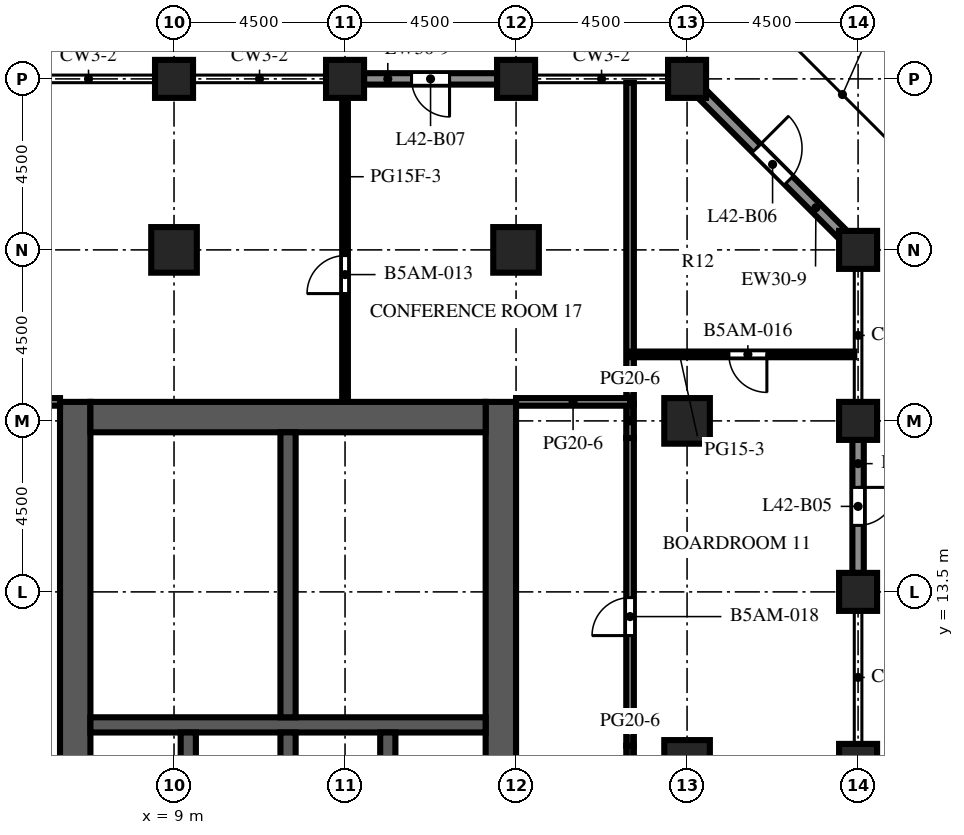
"""IFC4 building model, lengths in metres.
Left out: names, types, materials, properties, quantities, classifications, styles, units other than length and angle.
Written with IfcOpenShell. Run it as: python <this file> out.ifc"""

import sys

from ifc_helpers import new_model, si_unit, direction, frame, frame_2d, origin, origin_2d, place, context, subcontext, project, spatial, rectangle, extrude, element, fill, save


model = new_model("IFC4")
c1 = context("Model", 3, precision=1e-05, world=origin(), true_north=direction((0.0, 1.0)))
c2 = subcontext(c1, "Body", "Model", "MODEL_VIEW")
j1 = project(units=[si_unit("LENGTHUNIT", "METRE"), si_unit("PLANEANGLEUNIT", "RADIAN")], contexts=[c1])
p1 = place(None, origin())
s1 = spatial("IfcSite", under=j1, at=p1, CompositionType="ELEMENT")
p2 = place(p1, origin())
s2 = spatial("IfcBuilding", under=s1, at=p2, CompositionType="ELEMENT")
p3 = place(p2, frame((0.0, 0.0, 185.5)))
s3 = spatial("IfcBuildingStorey", under=s2, at=p3, CompositionType="ELEMENT", Elevation=185.5)
for number, where, z_axis, x_axis in (
    (1, (9.0, 27.0, 0.0), (0.0, 0.0, 1.0), (1.0, 0.0, 0.0)),
    (2, (13.5, 27.0, 0.0), (0.0, 0.0, 1.0), (1.0, 0.0, 0.0)),
    (3, (18.0, 27.0, 0.0), (0.0, 0.0, 1.0), (1.0, 0.0, 0.0)),
    (4, (22.5, 27.0, 0.0), (0.0, 0.0, 1.0), (1.0, 0.0, 0.0)),
):
    element("IfcColumn", number, at=place(p3, frame(where, z_axis=z_axis, x_axis=x_axis)), inside=s3, PredefinedType="COLUMN", context=c2, shape_type="SweptSolid", body=[
        extrude(rectangle(XDim=1.0, YDim=1.0, at=origin_2d()), origin(), (0.0, 0.0, 1.0), 6.0),
    ])
p4 = place(p3, frame((27.0, 9.0, 0.0), z_axis=(0.0, 0.0, 1.0), x_axis=(1.0, 0.0, 0.0)))
e5 = element("IfcColumn", 5, at=p4, inside=s3, PredefinedType="COLUMN", context=c2, shape_type="SweptSolid", body=[
    extrude(rectangle(XDim=1.0, YDim=1.0, at=origin_2d()), origin(), (0.0, 0.0, 1.0), 5.55),
])
p5 = place(p3, frame((27.0, 13.5, 0.0), z_axis=(0.0, 0.0, 1.0), x_axis=(1.0, 0.0, 0.0)))
e6 = element("IfcColumn", 6, at=p5, inside=s3, PredefinedType="COLUMN", context=c2, shape_type="SweptSolid", body=[
    extrude(rectangle(XDim=1.0, YDim=1.0, at=origin_2d()), origin(), (0.0, 0.0, 1.0), 6.0),
])
p6 = place(p3, frame((27.0, 18.0, 0.0), z_axis=(0.0, 0.0, 1.0), x_axis=(1.0, 0.0, 0.0)))
e7 = element("IfcColumn", 7, at=p6, inside=s3, PredefinedType="COLUMN", context=c2, shape_type="SweptSolid", body=[
    extrude(rectangle(XDim=1.0, YDim=1.0, at=origin_2d()), origin(), (0.0, 0.0, 1.0), 5.55),
])
p7 = place(p3, frame((27.0, 22.5, 0.0), z_axis=(0.0, 0.0, 1.0), x_axis=(1.0, 0.0, 0.0)))
e8 = element("IfcColumn", 8, at=p7, inside=s3, PredefinedType="COLUMN", context=c2, shape_type="SweptSolid", body=[
    extrude(rectangle(XDim=1.0, YDim=1.0, at=origin_2d()), origin(), (0.0, 0.0, 1.0), 6.0),
])
for number, where, z_axis, x_axis in (
    (9, (9.0, 22.5, 0.0), (0.0, 0.0, 1.0), (1.0, 0.0, 0.0)),
    (10, (18.0, 22.5, 0.0), (0.0, 0.0, 1.0), (1.0, 0.0, 0.0)),
):
    element("IfcColumn", number, at=place(p3, frame(where, z_axis=z_axis, x_axis=x_axis)), inside=s3, PredefinedType="COLUMN", context=c2, shape_type="SweptSolid", body=[
        extrude(rectangle(XDim=1.2, YDim=1.2, at=origin_2d()), origin(), (0.0, 0.0, 1.0), 6.0),
    ])
for number, where, z_axis, x_axis in (
    (11, (22.5, 9.0, 0.0), (0.0, 0.0, 1.0), (1.0, 0.0, 0.0)),
    (12, (22.5, 18.0, 0.0), (0.0, 0.0, 1.0), (1.0, 0.0, 0.0)),
):
    element("IfcColumn", number, at=place(p3, frame(where, z_axis=z_axis, x_axis=x_axis)), inside=s3, PredefinedType="COLUMN", context=c2, shape_type="SweptSolid", body=[
        extrude(rectangle(XDim=1.2, YDim=1.2, at=origin_2d()), origin(), (0.0, 0.0, 1.0), 5.55),
    ])
p8 = place(p3, frame((6.4, -9.0, 0.0), z_axis=(0.0, 0.0, 1.0), x_axis=(0.0, 1.0, 0.0)))
e13 = element("IfcWall", 13, at=p8, inside=s3, PredefinedType="SHEAR", context=c2, shape_type="SweptSolid", body=[
    extrude(rectangle(XDim=27.5, YDim=0.8, at=frame_2d((13.75, 0.0))), origin(), (0.0, 0.0, 1.0), 6.0),
])
p9 = place(p8, frame((12.55, 0.0, 0.0)))
e14 = element("IfcOpeningElement", 14, at=p9, cuts=e13, PredefinedType="OPENING", context=c2, shape_type="SweptSolid", body=[
    extrude(rectangle(XDim=2.4, YDim=2.4, at=frame_2d((1.2, 1.2))), frame((0.0, 0.41, 0.0), z_axis=(0.0, -1.0, 0.0), x_axis=(1.0, 0.0, 0.0)), (0.0, 0.0, 1.0), 0.82),
])
p10 = place(p8, frame((3.85, 0.0, 0.0)))
e15 = element("IfcOpeningElement", 15, at=p10, cuts=e13, PredefinedType="OPENING", context=c2, shape_type="SweptSolid", body=[
    extrude(rectangle(XDim=0.95, YDim=2.1, at=frame_2d((0.475, 1.05))), frame((0.0, 0.41, 0.0), z_axis=(0.0, -1.0, 0.0), x_axis=(1.0, 0.0, 0.0)), (0.0, 0.0, 1.0), 0.82),
])
p11 = place(p8, frame((23.475, 0.0, 0.0)))
e16 = element("IfcOpeningElement", 16, at=p11, cuts=e13, PredefinedType="OPENING", context=c2, shape_type="SweptSolid", body=[
    extrude(rectangle(XDim=1.2, YDim=2.1, at=frame_2d((0.6, 1.05))), frame((0.0, 0.41, 0.0), z_axis=(0.0, -1.0, 0.0), x_axis=(1.0, 0.0, 0.0)), (0.0, 0.0, 1.0), 0.82),
])
p12 = place(p3, frame((17.6, -9.0, 0.0), z_axis=(0.0, 0.0, 1.0), x_axis=(0.0, 1.0, 0.0)))
e17 = element("IfcWall", 17, at=p12, inside=s3, PredefinedType="SHEAR", context=c2, shape_type="SweptSolid", body=[
    extrude(rectangle(XDim=27.5, YDim=0.8, at=frame_2d((13.75, 0.0))), origin(), (0.0, 0.0, 1.0), 6.0),
])
p13 = place(p12, frame((12.55, 0.0, 0.0)))
e18 = element("IfcOpeningElement", 18, at=p13, cuts=e17, PredefinedType="OPENING", context=c2, shape_type="SweptSolid", body=[
    extrude(rectangle(XDim=2.4, YDim=2.4, at=frame_2d((1.2, 1.2))), frame((0.0, 0.41, 0.0), z_axis=(0.0, -1.0, 0.0), x_axis=(1.0, 0.0, 0.0)), (0.0, 0.0, 1.0), 0.82),
])
p14 = place(p12, frame((6.825, 0.0, 0.0)))
e19 = element("IfcOpeningElement", 19, at=p14, cuts=e17, PredefinedType="OPENING", context=c2, shape_type="SweptSolid", body=[
    extrude(rectangle(XDim=1.2, YDim=2.1, at=frame_2d((0.6, 1.05))), frame((0.0, 0.41, 0.0), z_axis=(0.0, -1.0, 0.0), x_axis=(1.0, 0.0, 0.0)), (0.0, 0.0, 1.0), 0.82),
])
p15 = place(p12, frame((19.475, 0.0, 0.0)))
e20 = element("IfcOpeningElement", 20, at=p15, cuts=e17, PredefinedType="OPENING", context=c2, shape_type="SweptSolid", body=[
    extrude(rectangle(XDim=1.2, YDim=2.1, at=frame_2d((0.6, 1.05))), frame((0.0, 0.41, 0.0), z_axis=(0.0, -1.0, 0.0), x_axis=(1.0, 0.0, 0.0)), (0.0, 0.0, 1.0), 0.82),
])
p16 = place(p3, frame((6.8, 18.1, 0.0), z_axis=(0.0, 0.0, 1.0), x_axis=(1.0, 0.0, 0.0)))
e21 = element("IfcWall", 21, at=p16, inside=s3, PredefinedType="SHEAR", context=c2, shape_type="SweptSolid", body=[
    extrude(rectangle(XDim=10.4, YDim=0.8, at=frame_2d((5.2, 0.0))), origin(), (0.0, 0.0, 1.0), 6.0),
])
p17 = place(p3, frame((6.8, 10.0, 0.0), z_axis=(0.0, 0.0, 1.0), x_axis=(1.0, 0.0, 0.0)))
e22 = element("IfcWall", 22, at=p17, inside=s3, PredefinedType="SHEAR", context=c2, shape_type="SweptSolid", body=[
    extrude(rectangle(XDim=10.4, YDim=0.4, at=frame_2d((5.2, 0.0))), origin(), (0.0, 0.0, 1.0), 6.0),
])
for number, where, z_axis, x_axis in (
    (23, (9.375, 6.9, 0.0), (0.0, 0.0, 1.0), (0.0, 1.0, 0.0)),
    (24, (12.0, 6.9, 0.0), (0.0, 0.0, 1.0), (0.0, 1.0, 0.0)),
    (25, (14.625, 6.9, 0.0), (0.0, 0.0, 1.0), (0.0, 1.0, 0.0)),
):
    element("IfcWall", number, at=place(p3, frame(where, z_axis=z_axis, x_axis=x_axis)), inside=s3, PredefinedType="SHEAR", context=c2, shape_type="SweptSolid", body=[
        extrude(rectangle(XDim=2.9, YDim=0.4, at=frame_2d((1.45, 0.0))), origin(), (0.0, 0.0, 1.0), 6.0),
    ])
p18 = place(p3, frame((12.0, 10.2, 0.0), z_axis=(0.0, 0.0, 1.0), x_axis=(0.0, 1.0, 0.0)))
e26 = element("IfcWall", 26, at=p18, inside=s3, PredefinedType="SHEAR", context=c2, shape_type="SweptSolid", body=[
    extrude(rectangle(XDim=7.5, YDim=0.4, at=frame_2d((3.75, 0.0))), origin(), (0.0, 0.0, 1.0), 6.0),
])
p19 = place(p3, frame((27.0, 17.5, 0.0), z_axis=(0.0, 0.0, 1.0), x_axis=(0.0, -1.0, 0.0)))
e27 = element("IfcWall", 27, at=p19, inside=s3, PredefinedType="SOLIDWALL", context=c2, shape_type="SweptSolid", body=[
    extrude(rectangle(XDim=3.5, YDim=0.3, at=frame_2d((1.75, 0.0))), origin(), (0.0, 0.0, 1.0), 3.75),
])
p20 = place(p19, frame((1.25, 0.0, 0.0)))
e28 = element("IfcOpeningElement", 28, at=p20, cuts=e27, PredefinedType="OPENING", context=c2, shape_type="SweptSolid", body=[
    extrude(rectangle(XDim=1.0, YDim=2.2, at=frame_2d((0.5, 1.1))), frame((0.0, 0.16, 0.0), z_axis=(0.0, -1.0, 0.0), x_axis=(1.0, 0.0, 0.0)), (0.0, 0.0, 1.0), 0.32),
])
p21 = place(p3, frame((22.894, 26.606, 0.0), z_axis=(0.0, 0.0, 1.0), x_axis=(0.707106781187, -0.707106781187, 0.0)))
e29 = element("IfcWall", 29, at=p21, inside=s3, PredefinedType="SOLIDWALL", context=c2, shape_type="SweptSolid", body=[
    extrude(rectangle(XDim=5.25, YDim=0.3, at=frame_2d((2.625, 0.0))), origin(), (0.0, 0.0, 1.0), 4.75),
])
p22 = place(p21, frame((2.025, 0.0, 0.0)))
e30 = element("IfcOpeningElement", 30, at=p22, cuts=e29, PredefinedType="OPENING", context=c2, shape_type="SweptSolid", body=[
    extrude(rectangle(XDim=1.2, YDim=2.2, at=frame_2d((0.6, 1.1))), frame((0.0, 0.16, 0.0), z_axis=(0.0, -1.0, 0.0), x_axis=(1.0, 0.0, 0.0)), (0.0, 0.0, 1.0), 0.32),
])
p23 = place(p3, frame((14.0, 27.0, 0.0), z_axis=(0.0, 0.0, 1.0), x_axis=(1.0, 0.0, 0.0)))
e31 = element("IfcWall", 31, at=p23, inside=s3, PredefinedType="SOLIDWALL", context=c2, shape_type="SweptSolid", body=[
    extrude(rectangle(XDim=3.5, YDim=0.3, at=frame_2d((1.75, 0.0))), origin(), (0.0, 0.0, 1.0), 4.75),
])
p24 = place(p23, frame((1.25, 0.0, 0.0)))
e32 = element("IfcOpeningElement", 32, at=p24, cuts=e31, PredefinedType="OPENING", context=c2, shape_type="SweptSolid", body=[
    extrude(rectangle(XDim=1.0, YDim=2.2, at=frame_2d((0.5, 1.1))), frame((0.0, 0.16, 0.0), z_axis=(0.0, -1.0, 0.0), x_axis=(1.0, 0.0, 0.0)), (0.0, 0.0, 1.0), 0.32),
])
p25 = place(p3, frame((6.8, 12.45, 0.0), z_axis=(0.0, 0.0, 1.0), x_axis=(1.0, 0.0, 0.0)))
e33 = element("IfcWall", 33, at=p25, inside=s3, PredefinedType="PARTITIONING", context=c2, shape_type="SweptSolid", body=[
    extrude(rectangle(XDim=1.3, YDim=0.1, at=frame_2d((0.65, 0.0))), origin(), (0.0, 0.0, 1.0), 5.55),
])
p26 = place(p25, frame((0.2, 0.0, 0.0)))
e34 = element("IfcOpeningElement", 34, at=p26, cuts=e33, PredefinedType="OPENING", context=c2, shape_type="SweptSolid", body=[
    extrude(rectangle(XDim=0.9, YDim=2.1, at=frame_2d((0.45, 1.05))), frame((0.0, 0.06, 0.0), z_axis=(0.0, -1.0, 0.0), x_axis=(1.0, 0.0, 0.0)), (0.0, 0.0, 1.0), 0.12),
])
p27 = place(p3, frame((8.1, 12.45, 0.0), z_axis=(0.0, 0.0, 1.0), x_axis=(1.0, 0.0, 0.0)))
e35 = element("IfcWall", 35, at=p27, inside=s3, PredefinedType="PARTITIONING", context=c2, shape_type="SweptSolid", body=[
    extrude(rectangle(XDim=3.7, YDim=0.1, at=frame_2d((1.85, 0.0))), origin(), (0.0, 0.0, 1.0), 5.55),
])
p28 = place(p3, frame((8.1, 12.45, 0.0), z_axis=(0.0, 0.0, 1.0), x_axis=(0.0, 1.0, 0.0)))
e36 = element("IfcWall", 36, at=p28, inside=s3, PredefinedType="PARTITIONING", context=c2, shape_type="SweptSolid", body=[
    extrude(rectangle(XDim=2.625, YDim=0.1, at=frame_2d((1.312, 0.0))), origin(), (0.0, 0.0, 1.0), 5.55),
])
p29 = place(p28, frame((0.812, 0.0, 0.0)))
e37 = element("IfcOpeningElement", 37, at=p29, cuts=e36, PredefinedType="OPENING", context=c2, shape_type="SweptSolid", body=[
    extrude(rectangle(XDim=1.0, YDim=2.1, at=frame_2d((0.5, 1.05))), frame((0.0, 0.06, 0.0), z_axis=(0.0, -1.0, 0.0), x_axis=(1.0, 0.0, 0.0)), (0.0, 0.0, 1.0), 0.12),
])
p30 = place(p3, frame((8.1, 15.075, 0.0), z_axis=(0.0, 0.0, 1.0), x_axis=(0.0, 1.0, 0.0)))
e38 = element("IfcWall", 38, at=p30, inside=s3, PredefinedType="PARTITIONING", context=c2, shape_type="SweptSolid", body=[
    extrude(rectangle(XDim=2.625, YDim=0.1, at=frame_2d((1.312, 0.0))), origin(), (0.0, 0.0, 1.0), 5.55),
])
p31 = place(p30, frame((0.812, 0.0, 0.0)))
e39 = element("IfcOpeningElement", 39, at=p31, cuts=e38, PredefinedType="OPENING", context=c2, shape_type="SweptSolid", body=[
    extrude(rectangle(XDim=1.0, YDim=2.1, at=frame_2d((0.5, 1.05))), frame((0.0, 0.06, 0.0), z_axis=(0.0, -1.0, 0.0), x_axis=(1.0, 0.0, 0.0)), (0.0, 0.0, 1.0), 0.12),
])
p32 = place(p3, frame((8.1, 15.075, 0.0), z_axis=(0.0, 0.0, 1.0), x_axis=(1.0, 0.0, 0.0)))
e40 = element("IfcWall", 40, at=p32, inside=s3, PredefinedType="PARTITIONING", context=c2, shape_type="SweptSolid", body=[
    extrude(rectangle(XDim=3.7, YDim=0.1, at=frame_2d((1.85, 0.0))), origin(), (0.0, 0.0, 1.0), 5.55),
])
p33 = place(p3, frame((13.5, 26.5, 0.0), z_axis=(0.0, 0.0, 1.0), x_axis=(0.0, -1.0, 0.0)))
e41 = element("IfcWall", 41, at=p33, inside=s3, PredefinedType="PARTITIONING", context=c2, shape_type="SweptSolid", body=[
    extrude(rectangle(XDim=8.0, YDim=0.15, at=frame_2d((4.0, 0.0))), origin(), (0.0, 0.0, 1.0), 5.55),
])
p34 = place(p33, frame((4.15, 0.0, 0.0)))
e42 = element("IfcOpeningElement", 42, at=p34, cuts=e41, PredefinedType="OPENING", context=c2, shape_type="SweptSolid", body=[
    extrude(rectangle(XDim=1.0, YDim=2.1, at=frame_2d((0.5, 1.05))), frame((0.0, 0.085, 0.0), z_axis=(0.0, -1.0, 0.0), x_axis=(1.0, 0.0, 0.0)), (0.0, 0.0, 1.0), 0.17),
])
p35 = place(p3, frame((21.0, 8.55, 0.0), z_axis=(0.0, 0.0, 1.0), x_axis=(0.0, 1.0, 0.0)))
e43 = element("IfcWall", 43, at=p35, inside=s3, PredefinedType="PARTITIONING", context=c2, shape_type="SweptSolid", body=[
    extrude(rectangle(XDim=0.9, YDim=0.2, at=frame_2d((0.45, 0.0))), origin(), (0.0, 0.0, 1.0), 3.72),
])
p36 = place(p3, frame((21.0, 17.55, 0.0), z_axis=(0.0, 0.0, 1.0), x_axis=(0.0, -1.0, 0.0)))
e44 = element("IfcWall", 44, at=p36, inside=s3, PredefinedType="PARTITIONING", context=c2, shape_type="SweptSolid", body=[
    extrude(rectangle(XDim=8.1, YDim=0.2, at=frame_2d((4.05, 0.0))), origin(), (0.0, 0.0, 1.0), 5.55),
])
p37 = place(p36, frame((4.2, 0.0, 0.0)))
e45 = element("IfcOpeningElement", 45, at=p37, cuts=e44, PredefinedType="OPENING", context=c2, shape_type="SweptSolid", body=[
    extrude(rectangle(XDim=1.0, YDim=2.1, at=frame_2d((0.5, 1.05))), frame((0.0, 0.11, 0.0), z_axis=(0.0, -1.0, 0.0), x_axis=(1.0, 0.0, 0.0)), (0.0, 0.0, 1.0), 0.22),
])
p38 = place(p3, frame((21.0, 17.55, 0.0), z_axis=(0.0, 0.0, 1.0), x_axis=(0.0, 1.0, 0.0)))
e46 = element("IfcWall", 46, at=p38, inside=s3, PredefinedType="PARTITIONING", context=c2, shape_type="SweptSolid", body=[
    extrude(rectangle(XDim=0.9, YDim=0.2, at=frame_2d((0.45, 0.0))), origin(), (0.0, 0.0, 1.0), 3.72),
])
p39 = place(p3, frame((21.0, 18.45, 0.0), z_axis=(0.0, 0.0, 1.0), x_axis=(0.0, 1.0, 0.0)))
e47 = element("IfcWall", 47, at=p39, inside=s3, PredefinedType="PARTITIONING", context=c2, shape_type="SweptSolid", body=[
    extrude(rectangle(XDim=8.45, YDim=0.2, at=frame_2d((4.225, 0.0))), origin(), (0.0, 0.0, 1.0), 5.55),
])
p40 = place(p3, frame((1.5, 18.5, 0.0), z_axis=(0.0, 0.0, 1.0), x_axis=(1.0, 0.0, 0.0)))
e48 = element("IfcWall", 48, at=p40, inside=s3, PredefinedType="PARTITIONING", context=c2, shape_type="SweptSolid", body=[
    extrude(rectangle(XDim=4.5, YDim=0.2, at=frame_2d((2.25, 0.0))), origin(), (0.0, 0.0, 1.0), 5.55),
])
p41 = place(p3, frame((18.0, 18.5, 0.0), z_axis=(0.0, 0.0, 1.0), x_axis=(1.0, 0.0, 0.0)))
e49 = element("IfcWall", 49, at=p41, inside=s3, PredefinedType="PARTITIONING", context=c2, shape_type="SweptSolid", body=[
    extrude(rectangle(XDim=3.0, YDim=0.2, at=frame_2d((1.5, 0.0))), origin(), (0.0, 0.0, 1.0), 3.72),
])
p42 = place(p3, frame((21.0, 19.75, 0.0), z_axis=(0.0, 0.0, 1.0), x_axis=(1.0, 0.0, 0.0)))
e50 = element("IfcWall", 50, at=p42, inside=s3, PredefinedType="PARTITIONING", context=c2, shape_type="SweptSolid", body=[
    extrude(rectangle(XDim=5.9, YDim=0.15, at=frame_2d((2.95, 0.0))), origin(), (0.0, 0.0, 1.0), 5.55),
])
p43 = place(p42, frame((2.6, 0.0, 0.0)))
e51 = element("IfcOpeningElement", 51, at=p43, cuts=e50, PredefinedType="OPENING", context=c2, shape_type="SweptSolid", body=[
    extrude(rectangle(XDim=1.0, YDim=2.1, at=frame_2d((0.5, 1.05))), frame((0.0, 0.085, 0.0), z_axis=(0.0, -1.0, 0.0), x_axis=(1.0, 0.0, 0.0)), (0.0, 0.0, 1.0), 0.17),
])
p44 = place(p20, origin())
e52 = element("IfcDoor", 52, at=p44, inside=s3, OperationType="SINGLE_SWING_LEFT", PredefinedType="DOOR", context=c2, shape_type="SweptSolid", body=[
    extrude(rectangle(XDim=1.0, YDim=2.2, at=frame_2d((0.5, 1.1))), frame((0.0, 0.025, 0.0), z_axis=(0.0, -1.0, 0.0), x_axis=(1.0, 0.0, 0.0)), (0.0, 0.0, 1.0), 0.05),
])
fill(e28, e52)
p45 = place(p22, origin())
e53 = element("IfcDoor", 53, at=p45, inside=s3, OperationType="SINGLE_SWING_LEFT", PredefinedType="DOOR", context=c2, shape_type="SweptSolid", body=[
    extrude(rectangle(XDim=1.2, YDim=2.2, at=frame_2d((0.6, 1.1))), frame((0.0, 0.025, 0.0), z_axis=(0.0, -1.0, 0.0), x_axis=(1.0, 0.0, 0.0)), (0.0, 0.0, 1.0), 0.05),
])
fill(e30, e53)
p46 = place(p24, origin())
e54 = element("IfcDoor", 54, at=p46, inside=s3, OperationType="SINGLE_SWING_RIGHT", PredefinedType="DOOR", context=c2, shape_type="SweptSolid", body=[
    extrude(rectangle(XDim=1.0, YDim=2.2, at=frame_2d((0.5, 1.1))), frame((0.0, 0.025, 0.0), z_axis=(0.0, -1.0, 0.0), x_axis=(1.0, 0.0, 0.0)), (0.0, 0.0, 1.0), 0.05),
])
fill(e32, e54)
p47 = place(p15, frame((1.2, 0.0, 0.0), z_axis=(0.0, 0.0, 1.0), x_axis=(-1.0, 0.0, 0.0)))
e55 = element("IfcDoor", 55, at=p47, inside=s3, OperationType="SINGLE_SWING_LEFT", PredefinedType="DOOR", context=c2, shape_type="SweptSolid", body=[
    extrude(rectangle(XDim=1.2, YDim=2.1, at=frame_2d((0.6, 1.05))), frame((0.0, 0.025, 0.0), z_axis=(0.0, -1.0, 0.0), x_axis=(1.0, 0.0, 0.0)), (0.0, 0.0, 1.0), 0.05),
])
fill(e20, e55)
p48 = place(p26, origin())
e56 = element("IfcDoor", 56, at=p48, inside=s3, OperationType="SINGLE_SWING_RIGHT", PredefinedType="DOOR", context=c2, shape_type="SweptSolid", body=[
    extrude(rectangle(XDim=0.9, YDim=2.1, at=frame_2d((0.45, 1.05))), frame((0.0, 0.025, 0.0), z_axis=(0.0, -1.0, 0.0), x_axis=(1.0, 0.0, 0.0)), (0.0, 0.0, 1.0), 0.05),
])
fill(e34, e56)
p49 = place(p11, origin())
e57 = element("IfcDoor", 57, at=p49, inside=s3, OperationType="SINGLE_SWING_LEFT", PredefinedType="DOOR", context=c2, shape_type="SweptSolid", body=[
    extrude(rectangle(XDim=1.2, YDim=2.1, at=frame_2d((0.6, 1.05))), frame((0.0, -0.325, 0.0), z_axis=(0.0, -1.0, 0.0), x_axis=(1.0, 0.0, 0.0)), (0.0, 0.0, 1.0), 0.05),
])
fill(e16, e57)
p50 = place(p29, origin())
e58 = element("IfcDoor", 58, at=p50, inside=s3, OperationType="SINGLE_SWING_RIGHT", PredefinedType="DOOR", context=c2, shape_type="SweptSolid", body=[
    extrude(rectangle(XDim=1.0, YDim=2.1, at=frame_2d((0.5, 1.05))), frame((0.0, 0.025, 0.0), z_axis=(0.0, -1.0, 0.0), x_axis=(1.0, 0.0, 0.0)), (0.0, 0.0, 1.0), 0.05),
])
fill(e37, e58)
p51 = place(p31, origin())
e59 = element("IfcDoor", 59, at=p51, inside=s3, OperationType="SINGLE_SWING_LEFT", PredefinedType="DOOR", context=c2, shape_type="SweptSolid", body=[
    extrude(rectangle(XDim=1.0, YDim=2.1, at=frame_2d((0.5, 1.05))), frame((0.0, 0.025, 0.0), z_axis=(0.0, -1.0, 0.0), x_axis=(1.0, 0.0, 0.0)), (0.0, 0.0, 1.0), 0.05),
])
fill(e39, e59)
p52 = place(p34, origin())
e60 = element("IfcDoor", 60, at=p52, inside=s3, OperationType="SINGLE_SWING_RIGHT", PredefinedType="DOOR", context=c2, shape_type="SweptSolid", body=[
    extrude(rectangle(XDim=1.0, YDim=2.1, at=frame_2d((0.5, 1.05))), frame((0.0, 0.025, 0.0), z_axis=(0.0, -1.0, 0.0), x_axis=(1.0, 0.0, 0.0)), (0.0, 0.0, 1.0), 0.05),
])
fill(e42, e60)
p53 = place(p43, origin())
e61 = element("IfcDoor", 61, at=p53, inside=s3, OperationType="SINGLE_SWING_RIGHT", PredefinedType="DOOR", context=c2, shape_type="SweptSolid", body=[
    extrude(rectangle(XDim=1.0, YDim=2.1, at=frame_2d((0.5, 1.05))), frame((0.0, 0.025, 0.0), z_axis=(0.0, -1.0, 0.0), x_axis=(1.0, 0.0, 0.0)), (0.0, 0.0, 1.0), 0.05),
])
fill(e51, e61)
p54 = place(p37, origin())
e62 = element("IfcDoor", 62, at=p54, inside=s3, OperationType="SINGLE_SWING_RIGHT", PredefinedType="DOOR", context=c2, shape_type="SweptSolid", body=[
    extrude(rectangle(XDim=1.0, YDim=2.1, at=frame_2d((0.5, 1.05))), frame((0.0, 0.025, 0.0), z_axis=(0.0, -1.0, 0.0), x_axis=(1.0, 0.0, 0.0)), (0.0, 0.0, 1.0), 0.05),
])
fill(e45, e62)
save(model, sys.argv[1])
